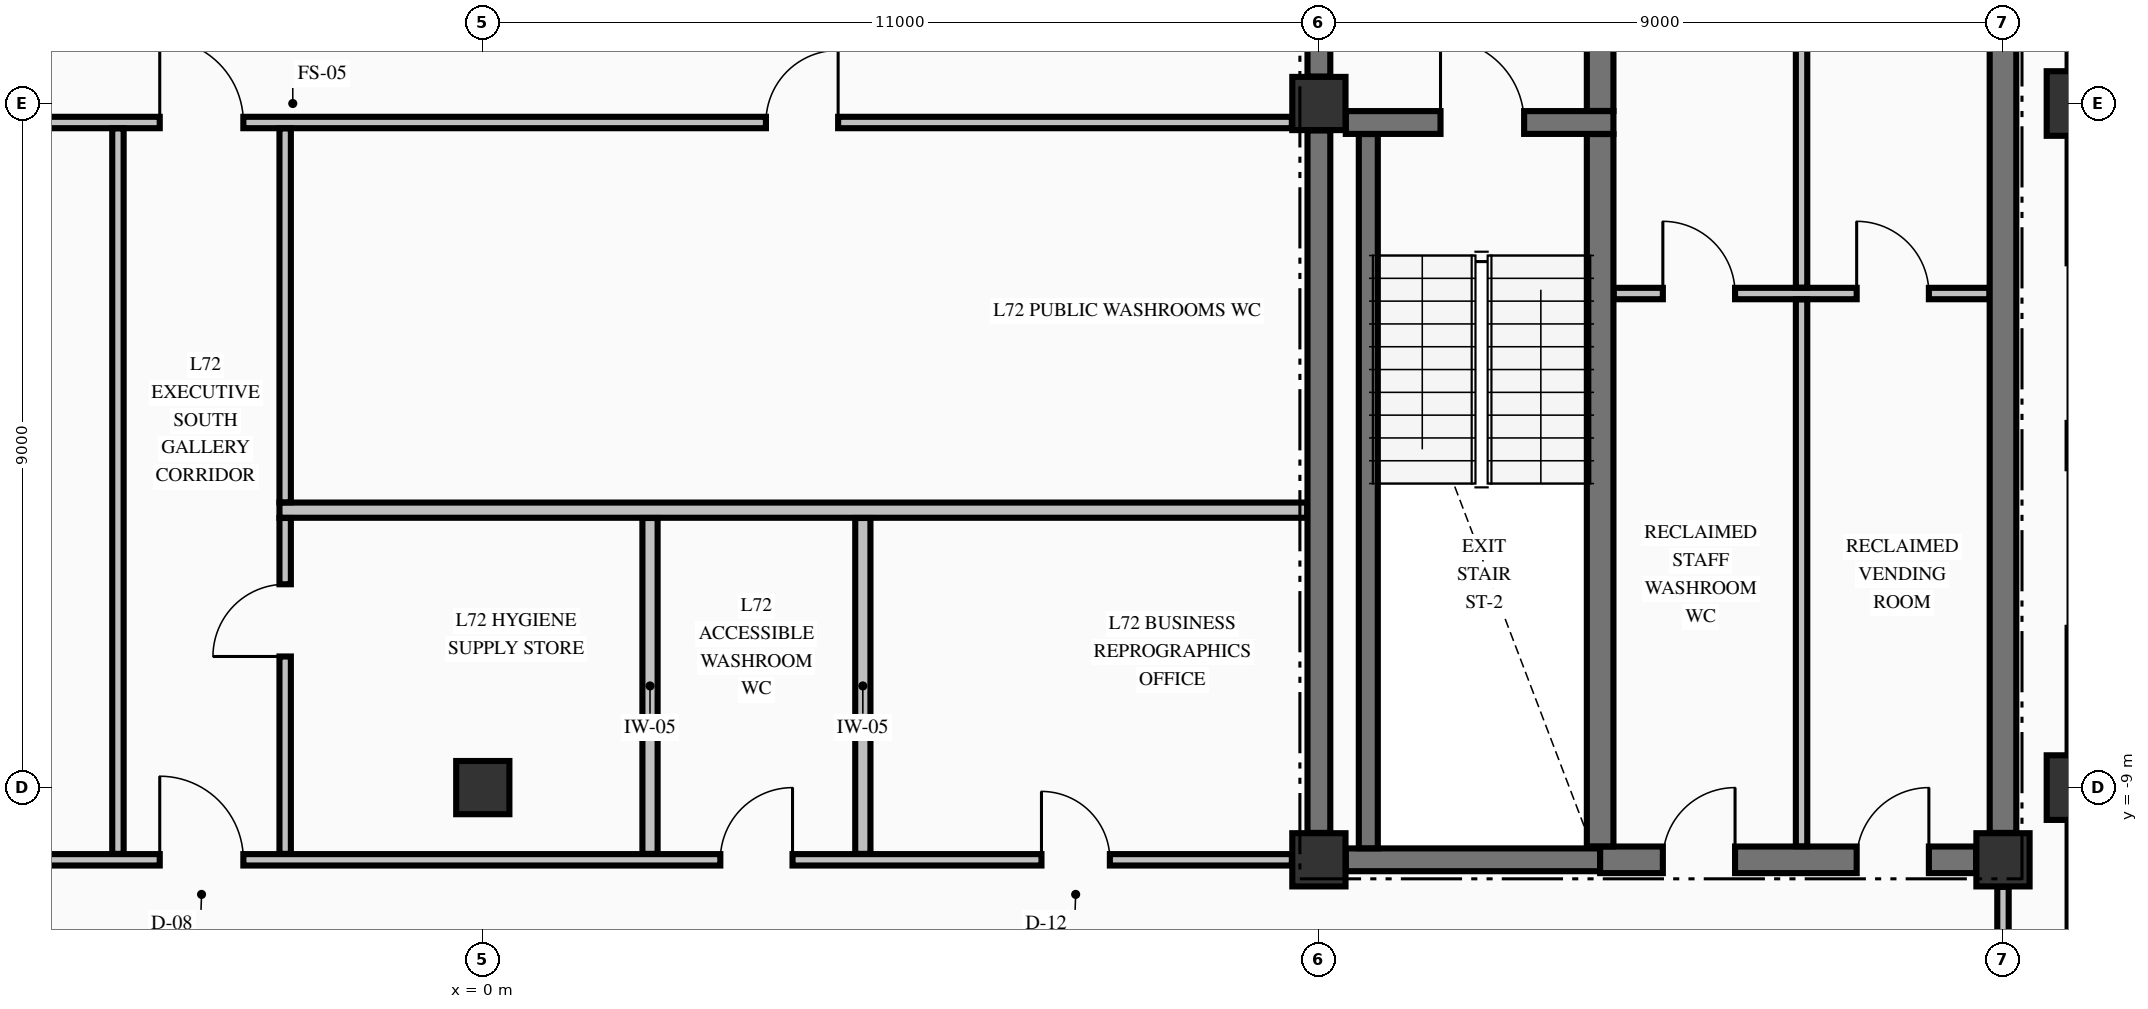
"""IFC4 building model, lengths in metres.
Left out: names, types, materials, properties, quantities, classifications, styles, units other than length and angle.
Written with IfcOpenShell. Run it as: python <this file> out.ifc"""

import sys

from ifc_helpers import new_model, si_unit, direction, frame, frame_2d, origin, origin_2d, place, context, subcontext, project, spatial, rectangle, extrude, element, fill, save


model = new_model("IFC4")
c1 = context("Model", 3, precision=1e-05, world=origin(), true_north=direction((0.0, 1.0)))
c2 = subcontext(c1, "Body", "Model", "MODEL_VIEW")
j1 = project(units=[si_unit("LENGTHUNIT", "METRE"), si_unit("PLANEANGLEUNIT", "RADIAN")], contexts=[c1])
p1 = place(None, origin())
s1 = spatial("IfcSite", under=j1, at=p1, CompositionType="ELEMENT")
p2 = place(p1, origin())
s2 = spatial("IfcBuilding", under=s1, at=p2, CompositionType="ELEMENT")
p3 = place(p2, frame((0.0, 0.0, 270.58)))
s3 = spatial("IfcBuildingStorey", under=s2, at=p3, CompositionType="ELEMENT", Elevation=270.58)
for number, where, z_axis, x_axis in (
    (1, (21.0, -9.0, -0.325), (0.0, 0.0, 1.0), (1.0, 0.0, 0.0)),
    (2, (21.0, 0.0, -0.325), (0.0, 0.0, 1.0), (1.0, 0.0, 0.0)),
):
    element("IfcColumn", number, at=place(p3, frame(where, z_axis=z_axis, x_axis=x_axis)), inside=s3, PredefinedType="COLUMN", context=c2, shape_type="SweptSolid", body=[
        extrude(rectangle(XDim=0.85, YDim=0.85, at=origin_2d()), origin(), (0.0, 0.0, 1.0), 3.815),
    ])
for number, where, z_axis, x_axis in (
    (3, (11.0, -9.95, -0.325), (0.0, 0.0, 1.0), (1.0, 0.0, 0.0)),
    (4, (11.0, 0.0, -0.325), (0.0, 0.0, 1.0), (1.0, 0.0, 0.0)),
    (5, (20.0, -9.95, -0.325), (0.0, 0.0, 1.0), (1.0, 0.0, 0.0)),
    (6, (0.0, -9.0, -0.325), (0.0, 0.0, 1.0), (1.0, 0.0, 0.0)),
):
    element("IfcColumn", number, at=place(p3, frame(where, z_axis=z_axis, x_axis=x_axis)), inside=s3, PredefinedType="COLUMN", context=c2, shape_type="SweptSolid", body=[
        extrude(rectangle(XDim=0.7, YDim=0.7, at=origin_2d()), origin(), (0.0, 0.0, 1.0), 3.815),
    ])
p4 = place(p3, frame((21.0, -17.545, 0.0), z_axis=(0.0, 0.0, 1.0), x_axis=(0.0, 1.0, 0.0)))
e7 = element("IfcWall", 7, at=p4, inside=s3, PredefinedType="STANDARD", context=c2, shape_type="SweptSolid", body=[
    extrude(rectangle(XDim=8.09, YDim=0.3, at=frame_2d((4.045, 0.0))), origin(), (0.0, 0.0, 1.0), 2.882),
])
p5 = place(p3, frame((21.0, -8.545, 0.0), z_axis=(0.0, 0.0, 1.0), x_axis=(0.0, 1.0, 0.0)))
e8 = element("IfcWall", 8, at=p5, inside=s3, PredefinedType="STANDARD", context=c2, shape_type="SweptSolid", body=[
    extrude(rectangle(XDim=8.09, YDim=0.3, at=frame_2d((4.045, 0.0))), origin(), (0.0, 0.0, 1.0), 2.882),
])
p6 = place(p5, frame((1.647, 0.0, 0.7)))
e9 = element("IfcOpeningElement", 9, at=p6, cuts=e8, PredefinedType="OPENING", context=c2, shape_type="SweptSolid", body=[
    extrude(rectangle(XDim=2.1, YDim=1.5, at=frame_2d((1.05, 0.75))), frame((0.0, 0.16, 0.0), z_axis=(0.0, -1.0, 0.0), x_axis=(1.0, 0.0, 0.0)), (0.0, 0.0, 1.0), 0.32),
])
p7 = place(p5, frame((4.343, 0.0, 0.7)))
e10 = element("IfcOpeningElement", 10, at=p7, cuts=e8, PredefinedType="OPENING", context=c2, shape_type="SweptSolid", body=[
    extrude(rectangle(XDim=2.1, YDim=1.5, at=frame_2d((1.05, 0.75))), frame((0.0, 0.16, 0.0), z_axis=(0.0, -1.0, 0.0), x_axis=(1.0, 0.0, 0.0)), (0.0, 0.0, 1.0), 0.32),
])
p8 = place(p3, frame((21.0, 0.455, 0.0), z_axis=(0.0, 0.0, 1.0), x_axis=(0.0, 1.0, 0.0)))
e11 = element("IfcWall", 11, at=p8, inside=s3, PredefinedType="STANDARD", context=c2, shape_type="SweptSolid", body=[
    extrude(rectangle(XDim=8.09, YDim=0.3, at=frame_2d((4.045, 0.0))), origin(), (0.0, 0.0, 1.0), 2.882),
])
p9 = place(p8, frame((1.647, 0.0, 0.7)))
e12 = element("IfcOpeningElement", 12, at=p9, cuts=e11, PredefinedType="OPENING", context=c2, shape_type="SweptSolid", body=[
    extrude(rectangle(XDim=2.1, YDim=1.5, at=frame_2d((1.05, 0.75))), frame((0.0, 0.16, 0.0), z_axis=(0.0, -1.0, 0.0), x_axis=(1.0, 0.0, 0.0)), (0.0, 0.0, 1.0), 0.32),
])
p10 = place(p8, frame((4.343, 0.0, 0.7)))
e13 = element("IfcOpeningElement", 13, at=p10, cuts=e11, PredefinedType="OPENING", context=c2, shape_type="SweptSolid", body=[
    extrude(rectangle(XDim=2.1, YDim=1.5, at=frame_2d((1.05, 0.75))), frame((0.0, 0.16, 0.0), z_axis=(0.0, -1.0, 0.0), x_axis=(1.0, 0.0, 0.0)), (0.0, 0.0, 1.0), 0.32),
])
p11 = place(p3, frame((11.354, -9.95, 0.0), z_axis=(0.0, 0.0, 1.0), x_axis=(1.0, 0.0, 0.0)))
e14 = element("IfcWall", 14, at=p11, inside=s3, PredefinedType="SHEAR", context=c2, shape_type="SweptSolid", body=[
    extrude(rectangle(XDim=3.346, YDim=0.3, at=frame_2d((1.673, 0.0))), origin(), (0.0, 0.0, 1.0), 3.49),
])
p12 = place(p3, frame((14.7, -9.95, 0.0), z_axis=(0.0, 0.0, 1.0), x_axis=(1.0, 0.0, 0.0)))
e15 = element("IfcWall", 15, at=p12, inside=s3, PredefinedType="SHEAR", context=c2, shape_type="SweptSolid", body=[
    extrude(rectangle(XDim=4.946, YDim=0.35, at=frame_2d((2.473, 0.0))), origin(), (0.0, 0.0, 1.0), 3.49),
])
p13 = place(p12, frame((0.825, 0.0, 0.0)))
e16 = element("IfcOpeningElement", 16, at=p13, cuts=e15, PredefinedType="OPENING", context=c2, shape_type="SweptSolid", body=[
    extrude(rectangle(XDim=0.95, YDim=2.15, at=frame_2d((0.475, 1.075))), frame((0.0, 0.185, 0.0), z_axis=(0.0, -1.0, 0.0), x_axis=(1.0, 0.0, 0.0)), (0.0, 0.0, 1.0), 0.37),
])
p14 = place(p12, frame((3.375, 0.0, 0.0)))
e17 = element("IfcOpeningElement", 17, at=p14, cuts=e15, PredefinedType="OPENING", context=c2, shape_type="SweptSolid", body=[
    extrude(rectangle(XDim=0.95, YDim=2.15, at=frame_2d((0.475, 1.075))), frame((0.0, 0.185, 0.0), z_axis=(0.0, -1.0, 0.0), x_axis=(1.0, 0.0, 0.0)), (0.0, 0.0, 1.0), 0.37),
])
p15 = place(p3, frame((11.354, -0.25, 0.0), z_axis=(0.0, 0.0, 1.0), x_axis=(1.0, 0.0, 0.0)))
e18 = element("IfcWall", 18, at=p15, inside=s3, PredefinedType="SHEAR", context=c2, shape_type="SweptSolid", body=[
    extrude(rectangle(XDim=3.521, YDim=0.3, at=frame_2d((1.76, 0.0))), origin(), (0.0, 0.0, 1.0), 3.49),
])
p16 = place(p15, frame((1.246, 0.0, 0.0)))
e19 = element("IfcOpeningElement", 19, at=p16, cuts=e18, PredefinedType="OPENING", context=c2, shape_type="SweptSolid", body=[
    extrude(rectangle(XDim=1.1, YDim=2.15, at=frame_2d((0.55, 1.075))), frame((0.0, 0.16, 0.0), z_axis=(0.0, -1.0, 0.0), x_axis=(1.0, 0.0, 0.0)), (0.0, 0.0, 1.0), 0.32),
])
p17 = place(p3, frame((-10.644, -9.95, 0.0), z_axis=(0.0, 0.0, 1.0), x_axis=(1.0, 0.0, 0.0)))
e20 = element("IfcWall", 20, at=p17, inside=s3, PredefinedType="PARTITIONING", context=c2, shape_type="SweptSolid", body=[
    extrude(rectangle(XDim=21.288, YDim=0.15, at=frame_2d((10.644, 0.0))), origin(), (0.0, 0.0, 1.0), 3.49),
])
p18 = place(p17, frame((6.394, 0.0, 0.0)))
e21 = element("IfcOpeningElement", 21, at=p18, cuts=e20, PredefinedType="OPENING", context=c2, shape_type="SweptSolid", body=[
    extrude(rectangle(XDim=1.1, YDim=2.15, at=frame_2d((0.55, 1.075))), frame((0.0, 0.085, 0.0), z_axis=(0.0, -1.0, 0.0), x_axis=(1.0, 0.0, 0.0)), (0.0, 0.0, 1.0), 0.17),
])
p19 = place(p17, frame((13.769, 0.0, 0.0)))
e22 = element("IfcOpeningElement", 22, at=p19, cuts=e20, PredefinedType="OPENING", context=c2, shape_type="SweptSolid", body=[
    extrude(rectangle(XDim=0.95, YDim=2.15, at=frame_2d((0.475, 1.075))), frame((0.0, 0.085, 0.0), z_axis=(0.0, -1.0, 0.0), x_axis=(1.0, 0.0, 0.0)), (0.0, 0.0, 1.0), 0.17),
])
p20 = place(p17, frame((17.994, 0.0, 0.0)))
e23 = element("IfcOpeningElement", 23, at=p20, cuts=e20, PredefinedType="OPENING", context=c2, shape_type="SweptSolid", body=[
    extrude(rectangle(XDim=0.9, YDim=2.15, at=frame_2d((0.45, 1.075))), frame((0.0, 0.085, 0.0), z_axis=(0.0, -1.0, 0.0), x_axis=(1.0, 0.0, 0.0)), (0.0, 0.0, 1.0), 0.17),
])
p21 = place(p3, frame((-2.675, -5.35, 0.0), z_axis=(0.0, 0.0, 1.0), x_axis=(1.0, 0.0, 0.0)))
e24 = element("IfcWall", 24, at=p21, inside=s3, PredefinedType="PARTITIONING", context=c2, shape_type="SweptSolid", body=[
    extrude(rectangle(XDim=13.522, YDim=0.2, at=frame_2d((6.761, 0.0))), origin(), (0.0, 0.0, 1.0), 3.49),
])
p22 = place(p3, frame((14.878, -2.5, 0.0), z_axis=(0.0, 0.0, 1.0), x_axis=(1.0, 0.0, 0.0)))
e25 = element("IfcWall", 25, at=p22, inside=s3, PredefinedType="PARTITIONING", context=c2, shape_type="SweptSolid", body=[
    extrude(rectangle(XDim=4.944, YDim=0.15, at=frame_2d((2.472, 0.0))), origin(), (0.0, 0.0, 1.0), 3.49),
])
p23 = place(p22, frame((0.647, 0.0, 0.0)))
e26 = element("IfcOpeningElement", 26, at=p23, cuts=e25, PredefinedType="OPENING", context=c2, shape_type="SweptSolid", body=[
    extrude(rectangle(XDim=0.95, YDim=2.15, at=frame_2d((0.475, 1.075))), frame((0.0, 0.085, 0.0), z_axis=(0.0, -1.0, 0.0), x_axis=(1.0, 0.0, 0.0)), (0.0, 0.0, 1.0), 0.17),
])
p24 = place(p22, frame((3.197, 0.0, 0.0)))
e27 = element("IfcOpeningElement", 27, at=p24, cuts=e25, PredefinedType="OPENING", context=c2, shape_type="SweptSolid", body=[
    extrude(rectangle(XDim=0.95, YDim=2.15, at=frame_2d((0.475, 1.075))), frame((0.0, 0.085, 0.0), z_axis=(0.0, -1.0, 0.0), x_axis=(1.0, 0.0, 0.0)), (0.0, 0.0, 1.0), 0.17),
])
p25 = place(p3, frame((-10.644, -0.25, 0.0), z_axis=(0.0, 0.0, 1.0), x_axis=(1.0, 0.0, 0.0)))
e28 = element("IfcWall", 28, at=p25, inside=s3, PredefinedType="PARTITIONING", context=c2, shape_type="SweptSolid", body=[
    extrude(rectangle(XDim=21.288, YDim=0.15, at=frame_2d((10.644, 0.0))), origin(), (0.0, 0.0, 1.0), 3.49),
])
p26 = place(p25, frame((6.394, 0.0, 0.0)))
e29 = element("IfcOpeningElement", 29, at=p26, cuts=e28, PredefinedType="OPENING", context=c2, shape_type="SweptSolid", body=[
    extrude(rectangle(XDim=1.1, YDim=2.15, at=frame_2d((0.55, 1.075))), frame((0.0, 0.085, 0.0), z_axis=(0.0, -1.0, 0.0), x_axis=(1.0, 0.0, 0.0)), (0.0, 0.0, 1.0), 0.17),
])
p27 = place(p25, frame((2.219, 0.0, 0.0)))
e30 = element("IfcOpeningElement", 30, at=p27, cuts=e28, PredefinedType="OPENING", context=c2, shape_type="SweptSolid", body=[
    extrude(rectangle(XDim=1.05, YDim=2.15, at=frame_2d((0.525, 1.075))), frame((0.0, 0.085, 0.0), z_axis=(0.0, -1.0, 0.0), x_axis=(1.0, 0.0, 0.0)), (0.0, 0.0, 1.0), 0.17),
])
p28 = place(p25, frame((14.369, 0.0, 0.0)))
e31 = element("IfcOpeningElement", 31, at=p28, cuts=e28, PredefinedType="OPENING", context=c2, shape_type="SweptSolid", body=[
    extrude(rectangle(XDim=0.95, YDim=2.15, at=frame_2d((0.475, 1.075))), frame((0.0, 0.085, 0.0), z_axis=(0.0, -1.0, 0.0), x_axis=(1.0, 0.0, 0.0)), (0.0, 0.0, 1.0), 0.17),
])
p29 = place(p3, frame((11.0, -9.596, 0.0), z_axis=(0.0, 0.0, 1.0), x_axis=(0.0, 1.0, 0.0)))
e32 = element("IfcWall", 32, at=p29, inside=s3, PredefinedType="SHEAR", context=c2, shape_type="SweptSolid", body=[
    extrude(rectangle(XDim=9.242, YDim=0.3, at=frame_2d((4.621, 0.0))), origin(), (0.0, 0.0, 1.0), 3.49),
])
p30 = place(p3, frame((11.0, 0.354, 0.0), z_axis=(0.0, 0.0, 1.0), x_axis=(0.0, 1.0, 0.0)))
e33 = element("IfcWall", 33, at=p30, inside=s3, PredefinedType="SHEAR", context=c2, shape_type="SweptSolid", body=[
    extrude(rectangle(XDim=2.394, YDim=0.3, at=frame_2d((1.197, 0.0))), origin(), (0.0, 0.0, 1.0), 3.49),
])
p31 = place(p30, frame((0.746, 0.0, 0.0)))
e34 = element("IfcOpeningElement", 34, at=p31, cuts=e33, PredefinedType="OPENING", context=c2, shape_type="SweptSolid", body=[
    extrude(rectangle(XDim=1.1, YDim=2.15, at=frame_2d((0.55, 1.075))), frame((0.0, 0.16, 0.0), z_axis=(0.0, -1.0, 0.0), x_axis=(1.0, 0.0, 0.0)), (0.0, 0.0, 1.0), 0.32),
])
p32 = place(p3, frame((11.65, -9.798, 0.0), z_axis=(0.0, 0.0, 1.0), x_axis=(0.0, 1.0, 0.0)))
e35 = element("IfcWall", 35, at=p32, inside=s3, PredefinedType="SOLIDWALL", context=c2, shape_type="SweptSolid", body=[
    extrude(rectangle(XDim=9.396, YDim=0.25, at=frame_2d((4.698, 0.0))), origin(), (0.0, 0.0, 1.0), 3.49),
])
p33 = place(p3, frame((14.7, -9.773, 0.0), z_axis=(0.0, 0.0, 1.0), x_axis=(0.0, 1.0, 0.0)))
e36 = element("IfcWall", 36, at=p33, inside=s3, PredefinedType="SHEAR", context=c2, shape_type="SweptSolid", body=[
    extrude(rectangle(XDim=9.371, YDim=0.35, at=frame_2d((4.686, 0.0))), origin(), (0.0, 0.0, 1.0), 3.49),
])
p34 = place(p3, frame((14.7, -0.098, 0.0), z_axis=(0.0, 0.0, 1.0), x_axis=(0.0, 1.0, 0.0)))
e37 = element("IfcWall", 37, at=p34, inside=s3, PredefinedType="SHEAR", context=c2, shape_type="SweptSolid", body=[
    extrude(rectangle(XDim=2.846, YDim=0.35, at=frame_2d((1.423, 0.0))), origin(), (0.0, 0.0, 1.0), 3.49),
])
p35 = place(p3, frame((20.0, -9.596, 0.0), z_axis=(0.0, 0.0, 1.0), x_axis=(0.0, 1.0, 0.0)))
e38 = element("IfcWall", 38, at=p35, inside=s3, PredefinedType="SHEAR", context=c2, shape_type="SweptSolid", body=[
    extrude(rectangle(XDim=14.769, YDim=0.35, at=frame_2d((7.385, 0.0))), origin(), (0.0, 0.0, 1.0), 3.49),
])
p36 = place(p3, frame((-4.8, -9.872, 0.0), z_axis=(0.0, 0.0, 1.0), x_axis=(0.0, 1.0, 0.0)))
e39 = element("IfcWall", 39, at=p36, inside=s3, PredefinedType="PARTITIONING", context=c2, shape_type="SweptSolid", body=[
    extrude(rectangle(XDim=9.544, YDim=0.15, at=frame_2d((4.772, 0.0))), origin(), (0.0, 0.0, 1.0), 3.49),
])
p37 = place(p3, frame((-2.6, -9.872, 0.0), z_axis=(0.0, 0.0, 1.0), x_axis=(0.0, 1.0, 0.0)))
e40 = element("IfcWall", 40, at=p37, inside=s3, PredefinedType="PARTITIONING", context=c2, shape_type="SweptSolid", body=[
    extrude(rectangle(XDim=4.419, YDim=0.15, at=frame_2d((2.209, 0.0))), origin(), (0.0, 0.0, 1.0), 3.49),
])
p38 = place(p37, frame((2.597, 0.0, 0.0)))
e41 = element("IfcOpeningElement", 41, at=p38, cuts=e40, PredefinedType="OPENING", context=c2, shape_type="SweptSolid", body=[
    extrude(rectangle(XDim=0.95, YDim=2.15, at=frame_2d((0.475, 1.075))), frame((0.0, 0.085, 0.0), z_axis=(0.0, -1.0, 0.0), x_axis=(1.0, 0.0, 0.0)), (0.0, 0.0, 1.0), 0.17),
])
p39 = place(p3, frame((-2.6, -5.247, 0.0), z_axis=(0.0, 0.0, 1.0), x_axis=(0.0, 1.0, 0.0)))
e42 = element("IfcWall", 42, at=p39, inside=s3, PredefinedType="PARTITIONING", context=c2, shape_type="SweptSolid", body=[
    extrude(rectangle(XDim=4.919, YDim=0.15, at=frame_2d((2.459, 0.0))), origin(), (0.0, 0.0, 1.0), 3.49),
])
for number, where, z_axis, x_axis in (
    (43, (2.2, -9.872, 0.0), (0.0, 0.0, 1.0), (0.0, 1.0, 0.0)),
    (44, (5.0, -9.872, 0.0), (0.0, 0.0, 1.0), (0.0, 1.0, 0.0)),
):
    element("IfcWall", number, at=place(p3, frame(where, z_axis=z_axis, x_axis=x_axis)), inside=s3, PredefinedType="PARTITIONING", context=c2, shape_type="SweptSolid", body=[
        extrude(rectangle(XDim=4.419, YDim=0.2, at=frame_2d((2.209, 0.0))), origin(), (0.0, 0.0, 1.0), 3.49),
    ])
p40 = place(p3, frame((17.35, -9.772, 0.0), z_axis=(0.0, 0.0, 1.0), x_axis=(0.0, 1.0, 0.0)))
e45 = element("IfcWall", 45, at=p40, inside=s3, PredefinedType="PARTITIONING", context=c2, shape_type="SweptSolid", body=[
    extrude(rectangle(XDim=7.194, YDim=0.15, at=frame_2d((3.597, 0.0))), origin(), (0.0, 0.0, 1.0), 3.49),
])
p41 = place(p3, frame((17.35, -2.422, 0.0), z_axis=(0.0, 0.0, 1.0), x_axis=(0.0, 1.0, 0.0)))
e46 = element("IfcWall", 46, at=p41, inside=s3, PredefinedType="PARTITIONING", context=c2, shape_type="SweptSolid", body=[
    extrude(rectangle(XDim=7.144, YDim=0.15, at=frame_2d((3.572, 0.0))), origin(), (0.0, 0.0, 1.0), 3.49),
])
p42 = place(p3, frame((20.0, -12.372, 0.0), z_axis=(0.0, 0.0, 1.0), x_axis=(0.0, 1.0, 0.0)))
e47 = element("IfcWall", 47, at=p42, inside=s3, PredefinedType="PARTITIONING", context=c2, shape_type="SweptSolid", body=[
    extrude(rectangle(XDim=2.066, YDim=0.15, at=frame_2d((1.033, 0.0))), origin(), (0.0, 0.0, 1.0), 3.08),
])
p43 = place(p16, origin())
e48 = element("IfcDoor", 48, at=p43, inside=s3, OperationType="SINGLE_SWING_LEFT", PredefinedType="DOOR", context=c2, shape_type="SweptSolid", body=[
    extrude(rectangle(XDim=1.1, YDim=2.15, at=frame_2d((0.55, 1.075))), frame((0.0, 0.025, 0.0), z_axis=(0.0, -1.0, 0.0), x_axis=(1.0, 0.0, 0.0)), (0.0, 0.0, 1.0), 0.05),
])
fill(e19, e48)
p44 = place(p13, origin())
e49 = element("IfcDoor", 49, at=p44, inside=s3, OperationType="SINGLE_SWING_RIGHT", PredefinedType="DOOR", context=c2, shape_type="SweptSolid", body=[
    extrude(rectangle(XDim=0.95, YDim=2.15, at=frame_2d((0.475, 1.075))), frame((0.0, 0.025, 0.0), z_axis=(0.0, -1.0, 0.0), x_axis=(1.0, 0.0, 0.0)), (0.0, 0.0, 1.0), 0.05),
])
fill(e16, e49)
p45 = place(p23, origin())
e50 = element("IfcDoor", 50, at=p45, inside=s3, OperationType="SINGLE_SWING_LEFT", PredefinedType="DOOR", context=c2, shape_type="SweptSolid", body=[
    extrude(rectangle(XDim=0.95, YDim=2.15, at=frame_2d((0.475, 1.075))), frame((0.0, 0.025, 0.0), z_axis=(0.0, -1.0, 0.0), x_axis=(1.0, 0.0, 0.0)), (0.0, 0.0, 1.0), 0.05),
])
fill(e26, e50)
p46 = place(p14, origin())
e51 = element("IfcDoor", 51, at=p46, inside=s3, OperationType="SINGLE_SWING_RIGHT", PredefinedType="DOOR", context=c2, shape_type="SweptSolid", body=[
    extrude(rectangle(XDim=0.95, YDim=2.15, at=frame_2d((0.475, 1.075))), frame((0.0, 0.025, 0.0), z_axis=(0.0, -1.0, 0.0), x_axis=(1.0, 0.0, 0.0)), (0.0, 0.0, 1.0), 0.05),
])
fill(e17, e51)
p47 = place(p24, origin())
e52 = element("IfcDoor", 52, at=p47, inside=s3, OperationType="SINGLE_SWING_LEFT", PredefinedType="DOOR", context=c2, shape_type="SweptSolid", body=[
    extrude(rectangle(XDim=0.95, YDim=2.15, at=frame_2d((0.475, 1.075))), frame((0.0, 0.025, 0.0), z_axis=(0.0, -1.0, 0.0), x_axis=(1.0, 0.0, 0.0)), (0.0, 0.0, 1.0), 0.05),
])
fill(e27, e52)
p48 = place(p18, origin())
e53 = element("IfcDoor", 53, at=p48, inside=s3, OperationType="SINGLE_SWING_LEFT", PredefinedType="DOOR", context=c2, shape_type="SweptSolid", body=[
    extrude(rectangle(XDim=1.1, YDim=2.15, at=frame_2d((0.55, 1.075))), frame((0.0, 0.025, 0.0), z_axis=(0.0, -1.0, 0.0), x_axis=(1.0, 0.0, 0.0)), (0.0, 0.0, 1.0), 0.05),
])
fill(e21, e53)
p49 = place(p26, origin())
e54 = element("IfcDoor", 54, at=p49, inside=s3, OperationType="SINGLE_SWING_LEFT", PredefinedType="DOOR", context=c2, shape_type="SweptSolid", body=[
    extrude(rectangle(XDim=1.1, YDim=2.15, at=frame_2d((0.55, 1.075))), frame((0.0, 0.025, 0.0), z_axis=(0.0, -1.0, 0.0), x_axis=(1.0, 0.0, 0.0)), (0.0, 0.0, 1.0), 0.05),
])
fill(e29, e54)
p50 = place(p28, origin())
e55 = element("IfcDoor", 55, at=p50, inside=s3, OperationType="SINGLE_SWING_RIGHT", PredefinedType="DOOR", context=c2, shape_type="SweptSolid", body=[
    extrude(rectangle(XDim=0.95, YDim=2.15, at=frame_2d((0.475, 1.075))), frame((0.0, 0.025, 0.0), z_axis=(0.0, -1.0, 0.0), x_axis=(1.0, 0.0, 0.0)), (0.0, 0.0, 1.0), 0.05),
])
fill(e31, e55)
p51 = place(p38, origin())
e56 = element("IfcDoor", 56, at=p51, inside=s3, OperationType="SINGLE_SWING_LEFT", PredefinedType="DOOR", context=c2, shape_type="SweptSolid", body=[
    extrude(rectangle(XDim=0.95, YDim=2.15, at=frame_2d((0.475, 1.075))), frame((0.0, 0.025, 0.0), z_axis=(0.0, -1.0, 0.0), x_axis=(1.0, 0.0, 0.0)), (0.0, 0.0, 1.0), 0.05),
])
fill(e41, e56)
p52 = place(p19, origin())
e57 = element("IfcDoor", 57, at=p52, inside=s3, OperationType="SINGLE_SWING_RIGHT", PredefinedType="DOOR", context=c2, shape_type="SweptSolid", body=[
    extrude(rectangle(XDim=0.95, YDim=2.15, at=frame_2d((0.475, 1.075))), frame((0.0, 0.025, 0.0), z_axis=(0.0, -1.0, 0.0), x_axis=(1.0, 0.0, 0.0)), (0.0, 0.0, 1.0), 0.05),
])
fill(e22, e57)
p53 = place(p20, origin())
e58 = element("IfcDoor", 58, at=p53, inside=s3, OperationType="SINGLE_SWING_LEFT", PredefinedType="DOOR", context=c2, shape_type="SweptSolid", body=[
    extrude(rectangle(XDim=0.9, YDim=2.15, at=frame_2d((0.45, 1.075))), frame((0.0, 0.025, 0.0), z_axis=(0.0, -1.0, 0.0), x_axis=(1.0, 0.0, 0.0)), (0.0, 0.0, 1.0), 0.05),
])
fill(e23, e58)
save(model, sys.argv[1])
